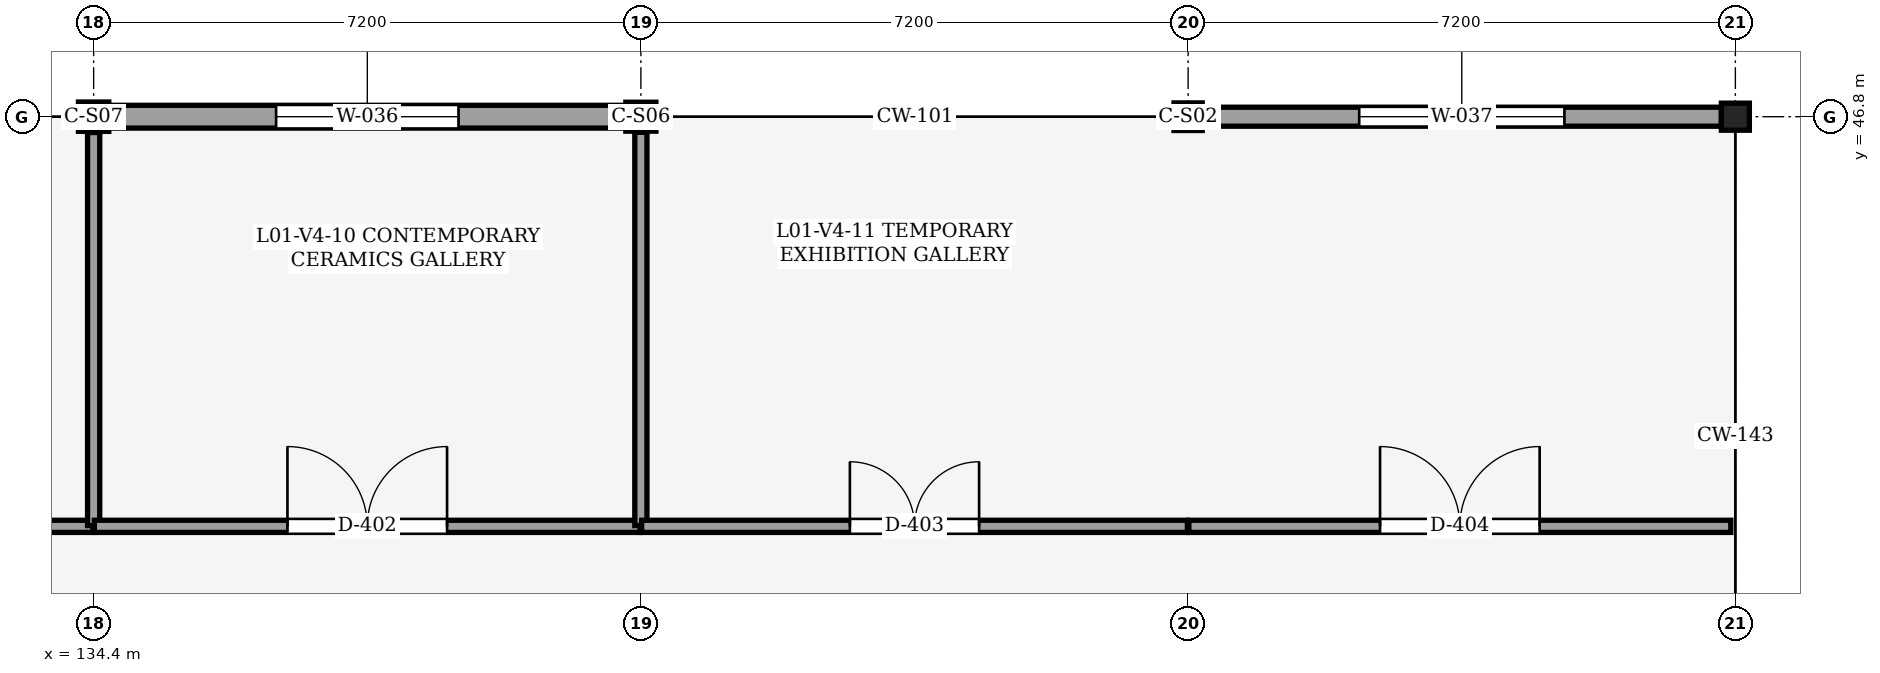
"""IFC4 building model, lengths in metres.
Left out: names, types, materials, properties, quantities, classifications, styles, units other than length and angle.
Written with IfcOpenShell. Run it as: python <this file> out.ifc"""

import sys

from ifc_helpers import new_model, si_unit, direction, frame, frame_2d, origin, origin_2d, place, context, subcontext, project, spatial, rectangle, i_section, extrude, element, fill, save


model = new_model("IFC4")
c1 = context("Model", 3, precision=1e-05, world=origin(), true_north=direction((0.0, 1.0)))
c2 = subcontext(c1, "Body", "Model", "MODEL_VIEW")
j1 = project(units=[si_unit("LENGTHUNIT", "METRE"), si_unit("PLANEANGLEUNIT", "RADIAN")], contexts=[c1])
p1 = place(None, origin())
s1 = spatial("IfcSite", under=j1, at=p1, CompositionType="ELEMENT")
p2 = place(p1, origin())
s2 = spatial("IfcBuilding", under=s1, at=p2, CompositionType="ELEMENT")
p3 = place(p2, frame((0.0, 0.0, 5.4)))
s3 = spatial("IfcBuildingStorey", under=s2, at=p3, CompositionType="ELEMENT", Elevation=5.4)
p4 = place(p3, frame((134.4, 46.8, 0.0), z_axis=(0.0, 0.0, 1.0), x_axis=(1.0, 0.0, 0.0)))
e1 = element("IfcColumn", 1, at=p4, inside=s3, PredefinedType="COLUMN", context=c2, shape_type="SweptSolid", body=[
    extrude(i_section(OverallWidth=0.399, OverallDepth=0.386, WebThickness=0.021, FlangeThickness=0.033, FilletRadius=0.025, at=origin_2d()), origin(), (0.0, 0.0, 1.0), 4.8),
])
p5 = place(p3, frame((141.6, 46.8, 0.0), z_axis=(0.0, 0.0, 1.0), x_axis=(1.0, 0.0, 0.0)))
e2 = element("IfcColumn", 2, at=p5, inside=s3, PredefinedType="COLUMN", context=c2, shape_type="SweptSolid", body=[
    extrude(i_section(OverallWidth=0.396, OverallDepth=0.381, WebThickness=0.019, FlangeThickness=0.03, FilletRadius=0.025, at=origin_2d()), origin(), (0.0, 0.0, 1.0), 4.8),
])
p6 = place(p3, frame((148.8, 46.8, 0.0), z_axis=(0.0, 0.0, 1.0), x_axis=(1.0, 0.0, 0.0)))
e3 = element("IfcColumn", 3, at=p6, inside=s3, PredefinedType="COLUMN", context=c2, shape_type="SweptSolid", body=[
    extrude(i_section(OverallWidth=0.371, OverallDepth=0.363, WebThickness=0.013, FlangeThickness=0.022, FilletRadius=0.025, at=origin_2d()), origin(), (0.0, 0.0, 1.0), 4.8),
])
p7 = place(p3, frame((156.0, 46.8, 0.0), z_axis=(0.0, 0.0, 1.0), x_axis=(1.0, 0.0, 0.0)))
e4 = element("IfcColumn", 4, at=p7, inside=s3, PredefinedType="COLUMN", context=c2, shape_type="SweptSolid", body=[
    extrude(i_section(OverallWidth=0.368, OverallDepth=0.356, WebThickness=0.011, FlangeThickness=0.018, FilletRadius=0.025, at=origin_2d()), origin(), (0.0, 0.0, 1.0), 4.8),
])
p8 = place(p3, frame((134.6, 46.8, 0.0), z_axis=(0.0, 0.0, 1.0), x_axis=(1.0, 0.0, 0.0)))
e5 = element("IfcWall", 5, at=p8, inside=s3, PredefinedType="SOLIDWALL", context=c2, shape_type="SweptSolid", body=[
    extrude(rectangle(XDim=6.802, YDim=0.3, at=frame_2d((3.401, 0.0))), origin(), (0.0, 0.0, 1.0), 3.987),
])
p9 = place(p8, frame((2.201, 0.0, 0.9)))
e6 = element("IfcOpeningElement", 6, at=p9, cuts=e5, PredefinedType="OPENING", context=c2, shape_type="SweptSolid", body=[
    extrude(rectangle(XDim=2.4, YDim=1.75, at=frame_2d((1.2, 0.875))), frame((0.0, 0.16, 0.0), z_axis=(0.0, -1.0, 0.0), x_axis=(1.0, 0.0, 0.0)), (0.0, 0.0, 1.0), 0.321),
])
p10 = place(p3, frame((148.986, 46.8, 0.0), z_axis=(0.0, 0.0, 1.0), x_axis=(1.0, 0.0, 0.0)))
e7 = element("IfcWall", 7, at=p10, inside=s3, PredefinedType="SOLIDWALL", context=c2, shape_type="SweptSolid", body=[
    extrude(rectangle(XDim=6.83, YDim=0.25, at=frame_2d((3.415, 0.0))), origin(), (0.0, 0.0, 1.0), 3.913),
])
p11 = place(p10, frame((2.065, 0.0, 0.9)))
e8 = element("IfcOpeningElement", 8, at=p11, cuts=e7, PredefinedType="OPENING", context=c2, shape_type="SweptSolid", body=[
    extrude(rectangle(XDim=2.7, YDim=1.75, at=frame_2d((1.35, 0.875))), frame((0.0, 0.135, 0.0), z_axis=(0.0, -1.0, 0.0), x_axis=(1.0, 0.0, 0.0)), (0.0, 0.0, 1.0), 0.271),
])
p12 = place(p3, frame((127.21, 41.41, 0.0), z_axis=(0.0, 0.0, 1.0), x_axis=(1.0, 0.0, 0.0)))
e9 = element("IfcWall", 9, at=p12, inside=s3, PredefinedType="PARTITIONING", context=c2, shape_type="SweptSolid", body=[
    extrude(rectangle(XDim=7.18, YDim=0.16, at=frame_2d((3.59, 0.0))), origin(), (0.0, 0.0, 1.0), 4.52),
])
p13 = place(p12, frame((2.74, 0.0, 0.0)))
e10 = element("IfcOpeningElement", 10, at=p13, cuts=e9, PredefinedType="OPENING", context=c2, shape_type="SweptSolid", body=[
    extrude(rectangle(XDim=1.7, YDim=2.4, at=frame_2d((0.85, 1.2))), frame((0.0, 0.09, 0.0), z_axis=(0.0, -1.0, 0.0), x_axis=(1.0, 0.0, 0.0)), (0.0, 0.0, 1.0), 0.18),
])
p14 = place(p3, frame((134.4, 41.42, 0.0), z_axis=(0.0, 0.0, 1.0), x_axis=(0.0, 1.0, 0.0)))
e11 = element("IfcWall", 11, at=p14, inside=s3, PredefinedType="PARTITIONING", context=c2, shape_type="SweptSolid", body=[
    extrude(rectangle(XDim=5.172, YDim=0.16, at=frame_2d((2.586, 0.0))), origin(), (0.0, 0.0, 1.0), 3.664),
])
p15 = place(p3, frame((134.41, 41.41, 0.0), z_axis=(0.0, 0.0, 1.0), x_axis=(1.0, 0.0, 0.0)))
e12 = element("IfcWall", 12, at=p15, inside=s3, PredefinedType="PARTITIONING", context=c2, shape_type="SweptSolid", body=[
    extrude(rectangle(XDim=7.18, YDim=0.16, at=frame_2d((3.59, 0.0))), origin(), (0.0, 0.0, 1.0), 4.52),
])
p16 = place(p15, frame((2.54, 0.0, 0.0)))
e13 = element("IfcOpeningElement", 13, at=p16, cuts=e12, PredefinedType="OPENING", context=c2, shape_type="SweptSolid", body=[
    extrude(rectangle(XDim=2.1, YDim=2.5, at=frame_2d((1.05, 1.25))), frame((0.0, 0.09, 0.0), z_axis=(0.0, -1.0, 0.0), x_axis=(1.0, 0.0, 0.0)), (0.0, 0.0, 1.0), 0.18),
])
p17 = place(p3, frame((141.6, 41.42, 0.0), z_axis=(0.0, 0.0, 1.0), x_axis=(0.0, 1.0, 0.0)))
e14 = element("IfcWall", 14, at=p17, inside=s3, PredefinedType="PARTITIONING", context=c2, shape_type="SweptSolid", body=[
    extrude(rectangle(XDim=5.175, YDim=0.16, at=frame_2d((2.587, 0.0))), origin(), (0.0, 0.0, 1.0), 3.593),
])
p18 = place(p3, frame((141.61, 41.41, 0.0), z_axis=(0.0, 0.0, 1.0), x_axis=(1.0, 0.0, 0.0)))
e15 = element("IfcWall", 15, at=p18, inside=s3, PredefinedType="PARTITIONING", context=c2, shape_type="SweptSolid", body=[
    extrude(rectangle(XDim=7.18, YDim=0.16, at=frame_2d((3.59, 0.0))), origin(), (0.0, 0.0, 1.0), 4.52),
])
p19 = place(p18, frame((2.74, 0.0, 0.0)))
e16 = element("IfcOpeningElement", 16, at=p19, cuts=e15, PredefinedType="OPENING", context=c2, shape_type="SweptSolid", body=[
    extrude(rectangle(XDim=1.7, YDim=2.4, at=frame_2d((0.85, 1.2))), frame((0.0, 0.09, 0.0), z_axis=(0.0, -1.0, 0.0), x_axis=(1.0, 0.0, 0.0)), (0.0, 0.0, 1.0), 0.18),
])
p20 = place(p3, frame((148.81, 41.41, 0.0), z_axis=(0.0, 0.0, 1.0), x_axis=(1.0, 0.0, 0.0)))
e17 = element("IfcWall", 17, at=p20, inside=s3, PredefinedType="PARTITIONING", context=c2, shape_type="SweptSolid", body=[
    extrude(rectangle(XDim=7.13, YDim=0.16, at=frame_2d((3.565, 0.0))), origin(), (0.0, 0.0, 1.0), 4.52),
])
p21 = place(p20, frame((2.515, 0.0, 0.0)))
e18 = element("IfcOpeningElement", 18, at=p21, cuts=e17, PredefinedType="OPENING", context=c2, shape_type="SweptSolid", body=[
    extrude(rectangle(XDim=2.1, YDim=2.5, at=frame_2d((1.05, 1.25))), frame((0.0, 0.09, 0.0), z_axis=(0.0, -1.0, 0.0), x_axis=(1.0, 0.0, 0.0)), (0.0, 0.0, 1.0), 0.18),
])
p22 = place(p9, origin())
e19 = element("IfcWindow", 19, at=p22, inside=s3, PartitioningType="SINGLE_PANEL", PredefinedType="WINDOW", context=c2, shape_type="SweptSolid", body=[
    extrude(rectangle(XDim=2.4, YDim=1.75, at=frame_2d((1.2, 0.875))), frame((0.0, 0.03, 0.0), z_axis=(0.0, -1.0, 0.0), x_axis=(1.0, 0.0, 0.0)), (0.0, 0.0, 1.0), 0.06),
])
fill(e6, e19)
p23 = place(p11, origin())
e20 = element("IfcWindow", 20, at=p23, inside=s3, PartitioningType="SINGLE_PANEL", PredefinedType="WINDOW", context=c2, shape_type="SweptSolid", body=[
    extrude(rectangle(XDim=2.7, YDim=1.75, at=frame_2d((1.35, 0.875))), frame((0.0, 0.03, 0.0), z_axis=(0.0, -1.0, 0.0), x_axis=(1.0, 0.0, 0.0)), (0.0, 0.0, 1.0), 0.06),
])
fill(e8, e20)
p24 = place(p16, origin())
e21 = element("IfcDoor", 21, at=p24, inside=s3, OperationType="DOUBLE_DOOR_SINGLE_SWING", PredefinedType="DOOR", context=c2, shape_type="SweptSolid", body=[
    extrude(rectangle(XDim=2.1, YDim=2.5, at=frame_2d((1.05, 1.25))), frame((0.0, 0.025, 0.0), z_axis=(0.0, -1.0, 0.0), x_axis=(1.0, 0.0, 0.0)), (0.0, 0.0, 1.0), 0.05),
])
fill(e13, e21)
p25 = place(p19, origin())
e22 = element("IfcDoor", 22, at=p25, inside=s3, OperationType="DOUBLE_DOOR_SINGLE_SWING", PredefinedType="DOOR", context=c2, shape_type="SweptSolid", body=[
    extrude(rectangle(XDim=1.7, YDim=2.4, at=frame_2d((0.85, 1.2))), frame((0.0, 0.025, 0.0), z_axis=(0.0, -1.0, 0.0), x_axis=(1.0, 0.0, 0.0)), (0.0, 0.0, 1.0), 0.05),
])
fill(e16, e22)
p26 = place(p21, origin())
e23 = element("IfcDoor", 23, at=p26, inside=s3, OperationType="DOUBLE_DOOR_SINGLE_SWING", PredefinedType="DOOR", context=c2, shape_type="SweptSolid", body=[
    extrude(rectangle(XDim=2.1, YDim=2.5, at=frame_2d((1.05, 1.25))), frame((0.0, 0.025, 0.0), z_axis=(0.0, -1.0, 0.0), x_axis=(1.0, 0.0, 0.0)), (0.0, 0.0, 1.0), 0.05),
])
fill(e18, e23)
save(model, sys.argv[1])
